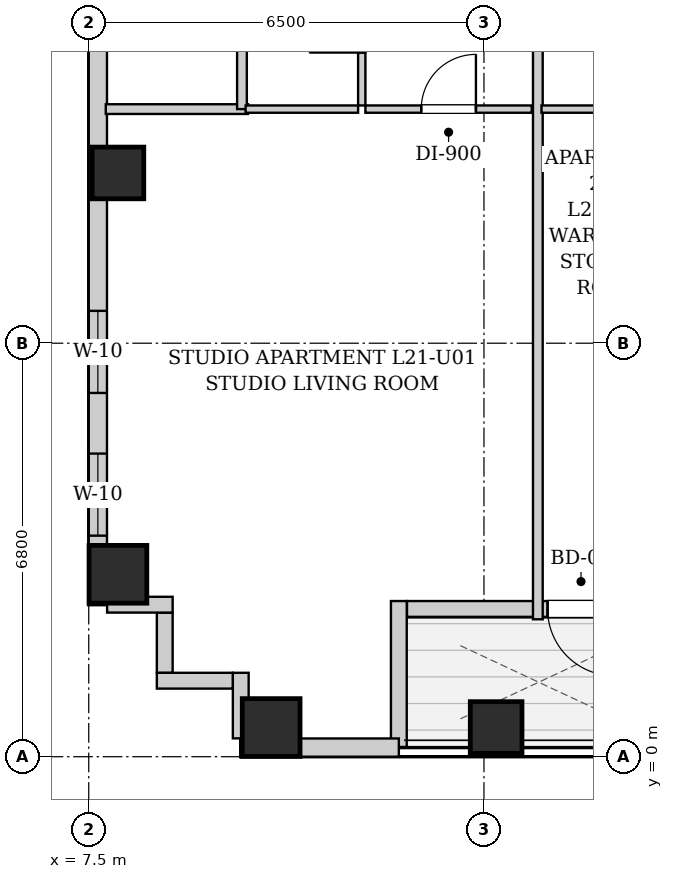
"""IFC4 building model, lengths in metres.
Left out: names, types, materials, properties, quantities, classifications, styles, units other than length and angle.
Written with IfcOpenShell. Run it as: python <this file> out.ifc"""

import sys

from ifc_helpers import new_model, si_unit, direction, frame, frame_2d, origin, origin_2d, place, context, subcontext, project, spatial, rectangle, extrude, element, fill, save


model = new_model("IFC4")
c1 = context("Model", 3, precision=1e-05, world=origin(), true_north=direction((0.0, 1.0)))
c2 = subcontext(c1, "Body", "Model", "MODEL_VIEW")
j1 = project(units=[si_unit("LENGTHUNIT", "METRE"), si_unit("PLANEANGLEUNIT", "RADIAN")], contexts=[c1])
p1 = place(None, origin())
s1 = spatial("IfcSite", under=j1, at=p1, CompositionType="ELEMENT")
p2 = place(p1, origin())
s2 = spatial("IfcBuilding", under=s1, at=p2, CompositionType="ELEMENT")
p3 = place(p2, frame((0.0, 0.0, 78.3)))
s3 = spatial("IfcBuildingStorey", under=s2, at=p3, CompositionType="ELEMENT", Elevation=78.3)
p4 = place(p3, frame((10.5, 0.48, 0.0), z_axis=(0.0, 0.0, 1.0), x_axis=(1.0, 0.0, 0.0)))
e1 = element("IfcColumn", 1, at=p4, inside=s3, PredefinedType="COLUMN", context=c2, shape_type="SweptSolid", body=[
    extrude(rectangle(XDim=0.95, YDim=0.95, at=origin_2d()), origin(), (0.0, 0.0, 1.0), 3.2),
])
p5 = place(p3, frame((14.2, 0.48, 0.0), z_axis=(0.0, 0.0, 1.0), x_axis=(1.0, 0.0, 0.0)))
e2 = element("IfcColumn", 2, at=p5, inside=s3, PredefinedType="COLUMN", context=c2, shape_type="SweptSolid", body=[
    extrude(rectangle(XDim=0.85, YDim=0.85, at=origin_2d()), origin(), (0.0, 0.0, 1.0), 3.2),
])
p6 = place(p3, frame((7.98, 3.0, 0.0), z_axis=(0.0, 0.0, 1.0), x_axis=(1.0, 0.0, 0.0)))
e3 = element("IfcColumn", 3, at=p6, inside=s3, PredefinedType="COLUMN", context=c2, shape_type="SweptSolid", body=[
    extrude(rectangle(XDim=0.95, YDim=0.95, at=origin_2d()), origin(), (0.0, 0.0, 1.0), 3.2),
])
p7 = place(p3, frame((7.98, 9.6, 0.0), z_axis=(0.0, 0.0, 1.0), x_axis=(1.0, 0.0, 0.0)))
e4 = element("IfcColumn", 4, at=p7, inside=s3, PredefinedType="COLUMN", context=c2, shape_type="SweptSolid", body=[
    extrude(rectangle(XDim=0.85, YDim=0.85, at=origin_2d()), origin(), (0.0, 0.0, 1.0), 3.2),
])
p8 = place(p3, frame((17.066, 2.43, 0.0), z_axis=(0.0, 0.0, 1.0), x_axis=(-1.0, 0.0, 0.0)))
e5 = element("IfcWall", 5, at=p8, inside=s3, PredefinedType="SOLIDWALL", context=c2, shape_type="SweptSolid", body=[
    extrude(rectangle(XDim=4.332, YDim=0.26, at=frame_2d((2.166, 0.0))), origin(), (0.0, 0.0, 1.0), 2.94),
])
p9 = place(p8, frame((0.92, 0.0, 0.0)))
e6 = element("IfcOpeningElement", 6, at=p9, cuts=e5, PredefinedType="OPENING", context=c2, shape_type="SweptSolid", body=[
    extrude(rectangle(XDim=1.1, YDim=2.0, at=frame_2d((0.55, 1.0))), frame((0.0, 0.14, 0.0), z_axis=(0.0, -1.0, 0.0), x_axis=(1.0, 0.0, 0.0)), (0.0, 0.0, 1.0), 0.28),
])
p10 = place(p3, frame((12.6, 2.56, 0.0), z_axis=(0.0, 0.0, 1.0), x_axis=(0.0, -1.0, 0.0)))
e7 = element("IfcWall", 7, at=p10, inside=s3, PredefinedType="SOLIDWALL", context=c2, shape_type="SweptSolid", body=[
    extrude(rectangle(XDim=2.4, YDim=0.26, at=frame_2d((1.2, 0.0))), origin(), (0.0, 0.0, 1.0), 2.94),
])
p11 = place(p3, frame((12.6, 0.15, 0.0), z_axis=(0.0, 0.0, 1.0), x_axis=(-1.0, 0.0, 0.0)))
e8 = element("IfcWall", 8, at=p11, inside=s3, PredefinedType="SOLIDWALL", context=c2, shape_type="SweptSolid", body=[
    extrude(rectangle(XDim=2.6, YDim=0.3, at=frame_2d((1.3, 0.0))), origin(), (0.0, 0.0, 1.0), 2.94),
])
p12 = place(p3, frame((7.65, 2.5, 0.0), z_axis=(0.0, 0.0, 1.0), x_axis=(0.0, 1.0, 0.0)))
e9 = element("IfcWall", 9, at=p12, inside=s3, PredefinedType="SOLIDWALL", context=c2, shape_type="SweptSolid", body=[
    extrude(rectangle(XDim=12.7, YDim=0.3, at=frame_2d((6.35, 0.0))), origin(), (0.0, 0.0, 1.0), 2.94),
])
p13 = place(p12, frame((3.482, 0.0, 0.55)))
e10 = element("IfcOpeningElement", 10, at=p13, cuts=e9, PredefinedType="OPENING", context=c2, shape_type="SweptSolid", body=[
    extrude(rectangle(XDim=1.35, YDim=1.2, at=frame_2d((0.675, 0.6))), frame((0.0, 0.16, 0.0), z_axis=(0.0, -1.0, 0.0), x_axis=(1.0, 0.0, 0.0)), (0.0, 0.0, 1.0), 0.32),
])
p14 = place(p12, frame((1.135, 0.0, 0.55)))
e11 = element("IfcOpeningElement", 11, at=p14, cuts=e9, PredefinedType="OPENING", context=c2, shape_type="SweptSolid", body=[
    extrude(rectangle(XDim=1.35, YDim=1.2, at=frame_2d((0.675, 0.6))), frame((0.0, 0.16, 0.0), z_axis=(0.0, -1.0, 0.0), x_axis=(1.0, 0.0, 0.0)), (0.0, 0.0, 1.0), 0.32),
])
p15 = place(p3, frame((10.0, 0.302, 0.0), z_axis=(0.0, 0.0, 1.0), x_axis=(0.0, 1.0, 0.0)))
e12 = element("IfcWall", 12, at=p15, inside=s3, PredefinedType="SOLIDWALL", context=c2, shape_type="SweptSolid", body=[
    extrude(rectangle(XDim=1.078, YDim=0.26, at=frame_2d((0.539, 0.0))), origin(), (0.0, 0.0, 1.0), 2.94),
])
p16 = place(p3, frame((9.868, 1.25, 0.0), z_axis=(0.0, 0.0, 1.0), x_axis=(-1.0, 0.0, 0.0)))
e13 = element("IfcWall", 13, at=p16, inside=s3, PredefinedType="SOLIDWALL", context=c2, shape_type="SweptSolid", body=[
    extrude(rectangle(XDim=1.248, YDim=0.26, at=frame_2d((0.624, 0.0))), origin(), (0.0, 0.0, 1.0), 2.94),
])
p17 = place(p3, frame((8.75, 1.382, 0.0), z_axis=(0.0, 0.0, 1.0), x_axis=(0.0, 1.0, 0.0)))
e14 = element("IfcWall", 14, at=p17, inside=s3, PredefinedType="SOLIDWALL", context=c2, shape_type="SweptSolid", body=[
    extrude(rectangle(XDim=0.986, YDim=0.26, at=frame_2d((0.493, 0.0))), origin(), (0.0, 0.0, 1.0), 2.94),
])
p18 = place(p3, frame((8.88, 2.5, 0.0), z_axis=(0.0, 0.0, 1.0), x_axis=(-1.0, 0.0, 0.0)))
e15 = element("IfcWall", 15, at=p18, inside=s3, PredefinedType="SOLIDWALL", context=c2, shape_type="SweptSolid", body=[
    extrude(rectangle(XDim=1.078, YDim=0.26, at=frame_2d((0.539, 0.0))), origin(), (0.0, 0.0, 1.0), 2.94),
])
p19 = place(p3, frame((7.78, 10.65, 0.0), z_axis=(0.0, 0.0, 1.0), x_axis=(1.0, 0.0, 0.0)))
e16 = element("IfcWall", 16, at=p19, inside=s3, PredefinedType="PARTITIONING", context=c2, shape_type="SweptSolid", body=[
    extrude(rectangle(XDim=2.34, YDim=0.16, at=frame_2d((1.17, 0.0))), origin(), (0.0, 0.0, 1.0), 2.94),
])
p20 = place(p3, frame((10.02, 10.65, 0.0), z_axis=(0.0, 0.0, 1.0), x_axis=(0.0, 1.0, 0.0)))
e17 = element("IfcWall", 17, at=p20, inside=s3, PredefinedType="PARTITIONING", context=c2, shape_type="SweptSolid", body=[
    extrude(rectangle(XDim=2.66, YDim=0.16, at=frame_2d((1.33, 0.0))), origin(), (0.0, 0.0, 1.0), 2.94),
])
p21 = place(p3, frame((11.99, 10.71, 0.0), z_axis=(0.0, 0.0, 1.0), x_axis=(0.0, 1.0, 0.0)))
e18 = element("IfcWall", 18, at=p21, inside=s3, PredefinedType="PARTITIONING", context=c2, shape_type="SweptSolid", body=[
    extrude(rectangle(XDim=2.6, YDim=0.12, at=frame_2d((1.3, 0.0))), origin(), (0.0, 0.0, 1.0), 2.94),
])
p22 = place(p21, frame((0.87, 0.0, 0.0)))
e19 = element("IfcOpeningElement", 19, at=p22, cuts=e18, PredefinedType="OPENING", context=c2, shape_type="SweptSolid", body=[
    extrude(rectangle(XDim=0.86, YDim=2.05, at=frame_2d((0.43, 1.025))), frame((0.0, 0.07, 0.0), z_axis=(0.0, -1.0, 0.0), x_axis=(1.0, 0.0, 0.0)), (0.0, 0.0, 1.0), 0.14),
])
p23 = place(p3, frame((10.08, 10.65, 0.0), z_axis=(0.0, 0.0, 1.0), x_axis=(1.0, 0.0, 0.0)))
e20 = element("IfcWall", 20, at=p23, inside=s3, PredefinedType="PARTITIONING", context=c2, shape_type="SweptSolid", body=[
    extrude(rectangle(XDim=1.85, YDim=0.12, at=frame_2d((0.925, 0.0))), origin(), (0.0, 0.0, 1.0), 2.94),
])
p24 = place(p3, frame((12.05, 10.65, 0.0), z_axis=(0.0, 0.0, 1.0), x_axis=(1.0, 0.0, 0.0)))
e21 = element("IfcWall", 21, at=p24, inside=s3, PredefinedType="PARTITIONING", context=c2, shape_type="SweptSolid", body=[
    extrude(rectangle(XDim=2.736, YDim=0.12, at=frame_2d((1.368, 0.0))), origin(), (0.0, 0.0, 1.0), 2.94),
])
p25 = place(p24, frame((0.918, 0.0, 0.0)))
e22 = element("IfcOpeningElement", 22, at=p25, cuts=e21, PredefinedType="OPENING", context=c2, shape_type="SweptSolid", body=[
    extrude(rectangle(XDim=0.9, YDim=2.05, at=frame_2d((0.45, 1.025))), frame((0.0, 0.07, 0.0), z_axis=(0.0, -1.0, 0.0), x_axis=(1.0, 0.0, 0.0)), (0.0, 0.0, 1.0), 0.14),
])
p26 = place(p3, frame((14.886, 2.26, 0.0), z_axis=(0.0, 0.0, 1.0), x_axis=(0.0, 1.0, 0.0)))
e23 = element("IfcWall", 23, at=p26, inside=s3, PredefinedType="PARTITIONING", context=c2, shape_type="SweptSolid", body=[
    extrude(rectangle(XDim=11.05, YDim=0.16, at=frame_2d((5.525, 0.0))), origin(), (0.0, 0.0, 1.0), 2.94),
])
p27 = place(p3, frame((14.946, 10.65, 0.0), z_axis=(0.0, 0.0, 1.0), x_axis=(1.0, 0.0, 0.0)))
e24 = element("IfcWall", 24, at=p27, inside=s3, PredefinedType="PARTITIONING", context=c2, shape_type="SweptSolid", body=[
    extrude(rectangle(XDim=2.3, YDim=0.12, at=frame_2d((1.15, 0.0))), origin(), (0.0, 0.0, 1.0), 2.94),
])
p28 = place(p22, origin())
e25 = element("IfcDoor", 25, at=p28, inside=s3, OperationType="SINGLE_SWING_LEFT", PredefinedType="DOOR", context=c2, shape_type="SweptSolid", body=[
    extrude(rectangle(XDim=0.86, YDim=2.05, at=frame_2d((0.43, 1.025))), frame((0.0, 0.025, 0.0), z_axis=(0.0, -1.0, 0.0), x_axis=(1.0, 0.0, 0.0)), (0.0, 0.0, 1.0), 0.05),
])
fill(e19, e25)
p29 = place(p25, origin())
e26 = element("IfcDoor", 26, at=p29, inside=s3, OperationType="SINGLE_SWING_RIGHT", PredefinedType="DOOR", context=c2, shape_type="SweptSolid", body=[
    extrude(rectangle(XDim=0.9, YDim=2.05, at=frame_2d((0.45, 1.025))), frame((0.0, 0.025, 0.0), z_axis=(0.0, -1.0, 0.0), x_axis=(1.0, 0.0, 0.0)), (0.0, 0.0, 1.0), 0.05),
])
fill(e22, e26)
p30 = place(p9, origin())
e27 = element("IfcDoor", 27, at=p30, inside=s3, OperationType="SINGLE_SWING_LEFT", PredefinedType="DOOR", context=c2, shape_type="SweptSolid", body=[
    extrude(rectangle(XDim=1.1, YDim=2.0, at=frame_2d((0.55, 1.0))), frame((0.0, 0.025, 0.0), z_axis=(0.0, -1.0, 0.0), x_axis=(1.0, 0.0, 0.0)), (0.0, 0.0, 1.0), 0.05),
])
fill(e6, e27)
p31 = place(p13, origin())
e28 = element("IfcWindow", 28, at=p31, inside=s3, PartitioningType="SINGLE_PANEL", PredefinedType="WINDOW", context=c2, shape_type="SweptSolid", body=[
    extrude(rectangle(XDim=1.35, YDim=1.2, at=frame_2d((0.675, 0.6))), frame((0.0, 0.03, 0.0), z_axis=(0.0, -1.0, 0.0), x_axis=(1.0, 0.0, 0.0)), (0.0, 0.0, 1.0), 0.06),
])
fill(e10, e28)
p32 = place(p14, origin())
e29 = element("IfcWindow", 29, at=p32, inside=s3, PartitioningType="SINGLE_PANEL", PredefinedType="WINDOW", context=c2, shape_type="SweptSolid", body=[
    extrude(rectangle(XDim=1.35, YDim=1.2, at=frame_2d((0.675, 0.6))), frame((0.0, 0.03, 0.0), z_axis=(0.0, -1.0, 0.0), x_axis=(1.0, 0.0, 0.0)), (0.0, 0.0, 1.0), 0.06),
])
fill(e11, e29)
save(model, sys.argv[1])
